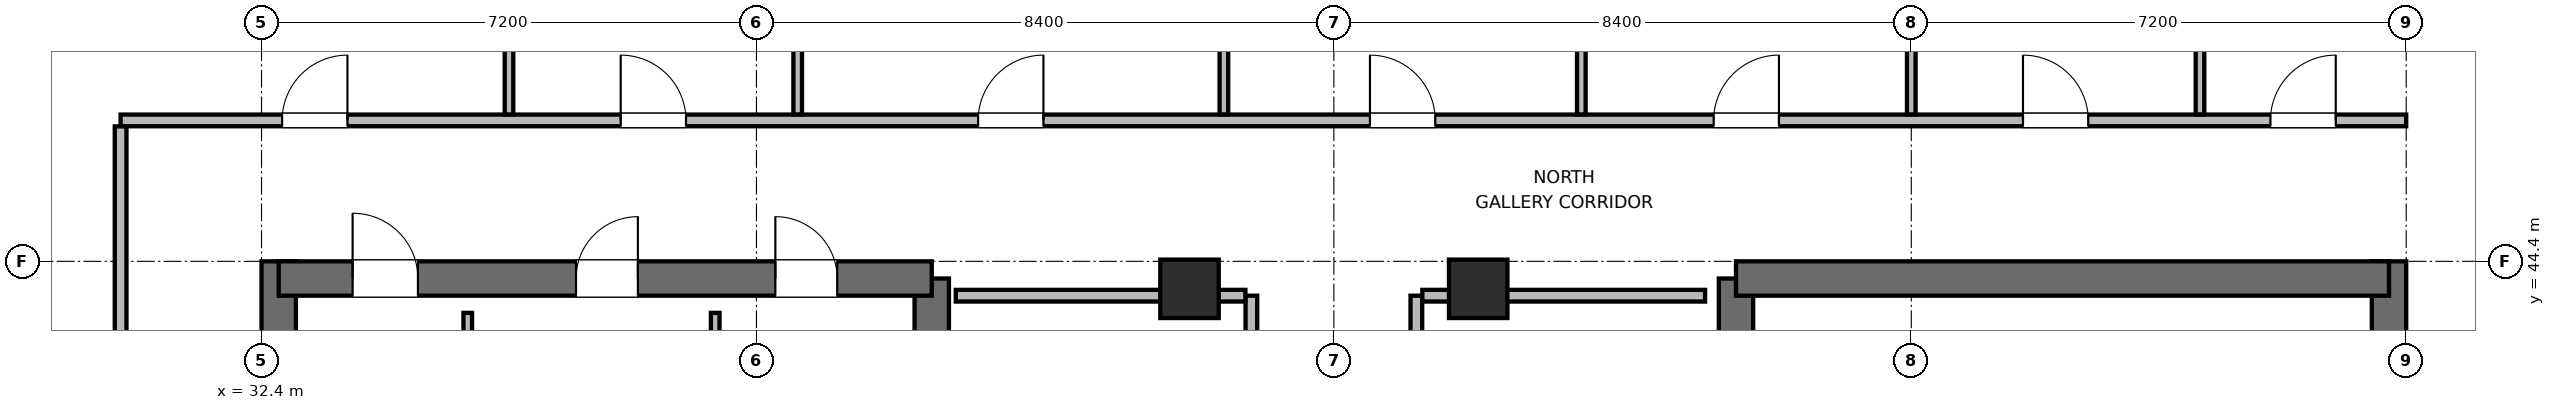
"""IFC4 building model, lengths in metres.
Left out: names, types, materials, properties, quantities, classifications, styles, units other than length and angle.
Written with IfcOpenShell. Run it as: python <this file> out.ifc"""

import sys

from ifc_helpers import new_model, si_unit, direction, frame, frame_2d, origin, origin_2d, place, context, subcontext, project, spatial, rectangle, extrude, element, fill, save


model = new_model("IFC4")
c1 = context("Model", 3, precision=1e-05, world=origin(), true_north=direction((0.0, 1.0)))
c2 = subcontext(c1, "Body", "Model", "MODEL_VIEW")
j1 = project(units=[si_unit("LENGTHUNIT", "METRE"), si_unit("PLANEANGLEUNIT", "RADIAN")], contexts=[c1])
p1 = place(None, origin())
s1 = spatial("IfcSite", under=j1, at=p1, CompositionType="ELEMENT")
p2 = place(p1, origin())
s2 = spatial("IfcBuilding", under=s1, at=p2, CompositionType="ELEMENT")
p3 = place(p2, frame((0.0, 0.0, 274.5)))
s3 = spatial("IfcBuildingStorey", under=s2, at=p3, CompositionType="ELEMENT", Elevation=274.5)
p4 = place(p3, frame((32.65, 27.6, 0.0), z_axis=(0.0, 0.0, 1.0), x_axis=(0.0, 1.0, 0.0)))
e1 = element("IfcWall", 1, at=p4, inside=s3, PredefinedType="SHEAR", context=c2, shape_type="SweptSolid", body=[
    extrude(rectangle(XDim=16.8, YDim=0.5, at=frame_2d((8.4, 0.0))), origin(), (0.0, 0.0, 1.0), 3.9),
])
p5 = place(p3, frame((42.15, 37.8, 0.0), z_axis=(0.0, 0.0, 1.0), x_axis=(0.0, 1.0, 0.0)))
e2 = element("IfcWall", 2, at=p5, inside=s3, PredefinedType="SHEAR", context=c2, shape_type="SweptSolid", body=[
    extrude(rectangle(XDim=6.35, YDim=0.5, at=frame_2d((3.175, 0.0))), origin(), (0.0, 0.0, 1.0), 3.9),
])
p6 = place(p3, frame((32.65, 44.15, 0.0), z_axis=(0.0, 0.0, 1.0), x_axis=(1.0, 0.0, 0.0)))
e3 = element("IfcWall", 3, at=p6, inside=s3, PredefinedType="SHEAR", context=c2, shape_type="SweptSolid", body=[
    extrude(rectangle(XDim=9.5, YDim=0.5, at=frame_2d((4.75, 0.0))), origin(), (0.0, 0.0, 1.0), 3.9),
])
p7 = place(p6, frame((1.075, 0.0, 0.0)))
e4 = element("IfcOpeningElement", 4, at=p7, cuts=e3, PredefinedType="OPENING", context=c2, shape_type="SweptSolid", body=[
    extrude(rectangle(XDim=0.95, YDim=2.04, at=frame_2d((0.475, 1.02))), frame((0.0, 0.26, 0.0), z_axis=(0.0, -1.0, 0.0), x_axis=(1.0, 0.0, 0.0)), (0.0, 0.0, 1.0), 0.52),
])
p8 = place(p6, frame((4.325, 0.0, 0.0)))
e5 = element("IfcOpeningElement", 5, at=p8, cuts=e3, PredefinedType="OPENING", context=c2, shape_type="SweptSolid", body=[
    extrude(rectangle(XDim=0.9, YDim=2.02, at=frame_2d((0.45, 1.01))), frame((0.0, 0.26, 0.0), z_axis=(0.0, -1.0, 0.0), x_axis=(1.0, 0.0, 0.0)), (0.0, 0.0, 1.0), 0.52),
])
p9 = place(p6, frame((7.225, 0.0, 0.0)))
e6 = element("IfcOpeningElement", 6, at=p9, cuts=e3, PredefinedType="OPENING", context=c2, shape_type="SweptSolid", body=[
    extrude(rectangle(XDim=0.9, YDim=2.02, at=frame_2d((0.45, 1.01))), frame((0.0, 0.26, 0.0), z_axis=(0.0, -1.0, 0.0), x_axis=(1.0, 0.0, 0.0)), (0.0, 0.0, 1.0), 0.52),
])
p10 = place(p3, frame((53.85, 38.0, 0.0), z_axis=(0.0, 0.0, 1.0), x_axis=(0.0, 1.0, 0.0)))
e7 = element("IfcWall", 7, at=p10, inside=s3, PredefinedType="SHEAR", context=c2, shape_type="SweptSolid", body=[
    extrude(rectangle(XDim=6.15, YDim=0.5, at=frame_2d((3.075, 0.0))), origin(), (0.0, 0.0, 1.0), 3.9),
])
p11 = place(p3, frame((63.35, 27.6, 0.0), z_axis=(0.0, 0.0, 1.0), x_axis=(0.0, 1.0, 0.0)))
e8 = element("IfcWall", 8, at=p11, inside=s3, PredefinedType="SHEAR", context=c2, shape_type="SweptSolid", body=[
    extrude(rectangle(XDim=16.8, YDim=0.5, at=frame_2d((8.4, 0.0))), origin(), (0.0, 0.0, 1.0), 3.9),
])
p12 = place(p3, frame((53.85, 44.15, 0.0), z_axis=(0.0, 0.0, 1.0), x_axis=(1.0, 0.0, 0.0)))
e9 = element("IfcWall", 9, at=p12, inside=s3, PredefinedType="SHEAR", context=c2, shape_type="SweptSolid", body=[
    extrude(rectangle(XDim=9.5, YDim=0.5, at=frame_2d((4.75, 0.0))), origin(), (0.0, 0.0, 1.0), 3.9),
])
for number, where, z_axis, x_axis in (
    (10, (45.9, 44.0, 0.0), (0.0, 0.0, 1.0), (1.0, 0.0, 0.0)),
    (11, (50.1, 44.0, 0.0), (0.0, 0.0, 1.0), (1.0, 0.0, 0.0)),
):
    element("IfcColumn", number, at=place(p3, frame(where, z_axis=z_axis, x_axis=x_axis)), inside=s3, PredefinedType="COLUMN", context=c2, shape_type="SweptSolid", body=[
        extrude(rectangle(XDim=0.85, YDim=0.85, at=origin_2d()), origin(), (0.0, 0.0, 1.0), 3.9),
    ])
for number, where, z_axis, x_axis in (
    (12, (35.4, 41.095, 0.0), (0.0, 0.0, 1.0), (0.0, 1.0, 0.0)),
    (13, (39.0, 41.095, 0.0), (0.0, 0.0, 1.0), (0.0, 1.0, 0.0)),
):
    element("IfcWall", number, at=place(p3, frame(where, z_axis=z_axis, x_axis=x_axis)), inside=s3, PredefinedType="PARTITIONING", context=c2, shape_type="SweptSolid", body=[
        extrude(rectangle(XDim=2.555, YDim=0.125, at=frame_2d((1.277, 0.0))), origin(), (0.0, 0.0, 1.0), 3.68),
    ])
p13 = place(p3, frame((46.8, 37.9, 0.0), z_axis=(0.0, 0.0, 1.0), x_axis=(0.0, 1.0, 0.0)))
e14 = element("IfcWall", 14, at=p13, inside=s3, PredefinedType="PARTITIONING", context=c2, shape_type="SweptSolid", body=[
    extrude(rectangle(XDim=6.0, YDim=0.17, at=frame_2d((3.0, 0.0))), origin(), (0.0, 0.0, 1.0), 3.68),
])
p14 = place(p13, frame((0.54, 0.0, 0.0)))
e15 = element("IfcOpeningElement", 15, at=p14, cuts=e14, PredefinedType="OPENING", context=c2, shape_type="SweptSolid", body=[
    extrude(rectangle(XDim=0.9, YDim=2.02, at=frame_2d((0.45, 1.01))), frame((0.0, 0.095, 0.0), z_axis=(0.0, -1.0, 0.0), x_axis=(1.0, 0.0, 0.0)), (0.0, 0.0, 1.0), 0.19),
])
p15 = place(p13, frame((2.55, 0.0, 0.0)))
e16 = element("IfcOpeningElement", 16, at=p15, cuts=e14, PredefinedType="OPENING", context=c2, shape_type="SweptSolid", body=[
    extrude(rectangle(XDim=0.9, YDim=2.02, at=frame_2d((0.45, 1.01))), frame((0.0, 0.095, 0.0), z_axis=(0.0, -1.0, 0.0), x_axis=(1.0, 0.0, 0.0)), (0.0, 0.0, 1.0), 0.19),
])
p16 = place(p13, frame((4.56, 0.0, 0.0)))
e17 = element("IfcOpeningElement", 17, at=p16, cuts=e14, PredefinedType="OPENING", context=c2, shape_type="SweptSolid", body=[
    extrude(rectangle(XDim=0.9, YDim=2.02, at=frame_2d((0.45, 1.01))), frame((0.0, 0.095, 0.0), z_axis=(0.0, -1.0, 0.0), x_axis=(1.0, 0.0, 0.0)), (0.0, 0.0, 1.0), 0.19),
])
p17 = place(p3, frame((42.5, 43.9, 0.0), z_axis=(0.0, 0.0, 1.0), x_axis=(1.0, 0.0, 0.0)))
e18 = element("IfcWall", 18, at=p17, inside=s3, PredefinedType="PARTITIONING", context=c2, shape_type="SweptSolid", body=[
    extrude(rectangle(XDim=4.213, YDim=0.17, at=frame_2d((2.106, 0.0))), origin(), (0.0, 0.0, 1.0), 2.765),
])
p18 = place(p3, frame((49.2, 37.9, 0.0), z_axis=(0.0, 0.0, 1.0), x_axis=(0.0, 1.0, 0.0)))
e19 = element("IfcWall", 19, at=p18, inside=s3, PredefinedType="PARTITIONING", context=c2, shape_type="SweptSolid", body=[
    extrude(rectangle(XDim=6.0, YDim=0.17, at=frame_2d((3.0, 0.0))), origin(), (0.0, 0.0, 1.0), 3.68),
])
p19 = place(p18, frame((0.69, 0.0, 0.0)))
e20 = element("IfcOpeningElement", 20, at=p19, cuts=e19, PredefinedType="OPENING", context=c2, shape_type="SweptSolid", body=[
    extrude(rectangle(XDim=0.9, YDim=2.02, at=frame_2d((0.45, 1.01))), frame((0.0, 0.095, 0.0), z_axis=(0.0, -1.0, 0.0), x_axis=(1.0, 0.0, 0.0)), (0.0, 0.0, 1.0), 0.19),
])
p20 = place(p18, frame((3.69, 0.0, 0.0)))
e21 = element("IfcOpeningElement", 21, at=p20, cuts=e19, PredefinedType="OPENING", context=c2, shape_type="SweptSolid", body=[
    extrude(rectangle(XDim=0.9, YDim=2.02, at=frame_2d((0.45, 1.01))), frame((0.0, 0.095, 0.0), z_axis=(0.0, -1.0, 0.0), x_axis=(1.0, 0.0, 0.0)), (0.0, 0.0, 1.0), 0.19),
])
p21 = place(p3, frame((49.287, 43.9, 0.0), z_axis=(0.0, 0.0, 1.0), x_axis=(1.0, 0.0, 0.0)))
e22 = element("IfcWall", 22, at=p21, inside=s3, PredefinedType="PARTITIONING", context=c2, shape_type="SweptSolid", body=[
    extrude(rectangle(XDim=4.113, YDim=0.17, at=frame_2d((2.056, 0.0))), origin(), (0.0, 0.0, 1.0), 2.765),
])
p22 = place(p3, frame((30.35, 46.45, 0.0), z_axis=(0.0, 0.0, 1.0), x_axis=(1.0, 0.0, 0.0)))
e23 = element("IfcWall", 23, at=p22, inside=s3, PredefinedType="PARTITIONING", context=c2, shape_type="SweptSolid", body=[
    extrude(rectangle(XDim=33.25, YDim=0.17, at=frame_2d((16.625, 0.0))), origin(), (0.0, 0.0, 1.0), 3.68),
])
p23 = place(p22, frame((2.35, 0.0, 0.0)))
e24 = element("IfcOpeningElement", 24, at=p23, cuts=e23, PredefinedType="OPENING", context=c2, shape_type="SweptSolid", body=[
    extrude(rectangle(XDim=0.95, YDim=2.04, at=frame_2d((0.475, 1.02))), frame((0.0, 0.095, 0.0), z_axis=(0.0, -1.0, 0.0), x_axis=(1.0, 0.0, 0.0)), (0.0, 0.0, 1.0), 0.19),
])
p24 = place(p22, frame((7.275, 0.0, 0.0)))
e25 = element("IfcOpeningElement", 25, at=p24, cuts=e23, PredefinedType="OPENING", context=c2, shape_type="SweptSolid", body=[
    extrude(rectangle(XDim=0.95, YDim=2.04, at=frame_2d((0.475, 1.02))), frame((0.0, 0.095, 0.0), z_axis=(0.0, -1.0, 0.0), x_axis=(1.0, 0.0, 0.0)), (0.0, 0.0, 1.0), 0.19),
])
p25 = place(p22, frame((12.475, 0.0, 0.0)))
e26 = element("IfcOpeningElement", 26, at=p25, cuts=e23, PredefinedType="OPENING", context=c2, shape_type="SweptSolid", body=[
    extrude(rectangle(XDim=0.95, YDim=2.04, at=frame_2d((0.475, 1.02))), frame((0.0, 0.095, 0.0), z_axis=(0.0, -1.0, 0.0), x_axis=(1.0, 0.0, 0.0)), (0.0, 0.0, 1.0), 0.19),
])
p26 = place(p22, frame((18.175, 0.0, 0.0)))
e27 = element("IfcOpeningElement", 27, at=p26, cuts=e23, PredefinedType="OPENING", context=c2, shape_type="SweptSolid", body=[
    extrude(rectangle(XDim=0.95, YDim=2.04, at=frame_2d((0.475, 1.02))), frame((0.0, 0.095, 0.0), z_axis=(0.0, -1.0, 0.0), x_axis=(1.0, 0.0, 0.0)), (0.0, 0.0, 1.0), 0.19),
])
p27 = place(p22, frame((23.175, 0.0, 0.0)))
e28 = element("IfcOpeningElement", 28, at=p27, cuts=e23, PredefinedType="OPENING", context=c2, shape_type="SweptSolid", body=[
    extrude(rectangle(XDim=0.95, YDim=2.04, at=frame_2d((0.475, 1.02))), frame((0.0, 0.095, 0.0), z_axis=(0.0, -1.0, 0.0), x_axis=(1.0, 0.0, 0.0)), (0.0, 0.0, 1.0), 0.19),
])
p28 = place(p22, frame((27.675, 0.0, 0.0)))
e29 = element("IfcOpeningElement", 29, at=p28, cuts=e23, PredefinedType="OPENING", context=c2, shape_type="SweptSolid", body=[
    extrude(rectangle(XDim=0.95, YDim=2.04, at=frame_2d((0.475, 1.02))), frame((0.0, 0.095, 0.0), z_axis=(0.0, -1.0, 0.0), x_axis=(1.0, 0.0, 0.0)), (0.0, 0.0, 1.0), 0.19),
])
p29 = place(p22, frame((31.275, 0.0, 0.0)))
e30 = element("IfcOpeningElement", 30, at=p29, cuts=e23, PredefinedType="OPENING", context=c2, shape_type="SweptSolid", body=[
    extrude(rectangle(XDim=0.95, YDim=2.04, at=frame_2d((0.475, 1.02))), frame((0.0, 0.095, 0.0), z_axis=(0.0, -1.0, 0.0), x_axis=(1.0, 0.0, 0.0)), (0.0, 0.0, 1.0), 0.19),
])
p30 = place(p3, frame((30.35, 25.637, 0.0), z_axis=(0.0, 0.0, 1.0), x_axis=(0.0, 1.0, 0.0)))
e31 = element("IfcWall", 31, at=p30, inside=s3, PredefinedType="PARTITIONING", context=c2, shape_type="SweptSolid", body=[
    extrude(rectangle(XDim=20.726, YDim=0.17, at=frame_2d((10.363, 0.0))), origin(), (0.0, 0.0, 1.0), 3.68),
])
p31 = place(p30, frame((9.888, 0.0, 0.0)))
e32 = element("IfcOpeningElement", 32, at=p31, cuts=e31, PredefinedType="OPENING", context=c2, shape_type="SweptSolid", body=[
    extrude(rectangle(XDim=0.95, YDim=2.04, at=frame_2d((0.475, 1.02))), frame((0.0, 0.095, 0.0), z_axis=(0.0, -1.0, 0.0), x_axis=(1.0, 0.0, 0.0)), (0.0, 0.0, 1.0), 0.19),
])
p32 = place(p3, frame((36.0, 46.537, 0.0), z_axis=(0.0, 0.0, 1.0), x_axis=(0.0, 1.0, 0.0)))
e33 = element("IfcWall", 33, at=p32, inside=s3, PredefinedType="PARTITIONING", context=c2, shape_type="SweptSolid", body=[
    extrude(rectangle(XDim=6.628, YDim=0.125, at=frame_2d((3.314, 0.0))), origin(), (0.0, 0.0, 1.0), 3.68),
])
p33 = place(p3, frame((40.2, 46.537, 0.0), z_axis=(0.0, 0.0, 1.0), x_axis=(0.0, 1.0, 0.0)))
e34 = element("IfcWall", 34, at=p33, inside=s3, PredefinedType="PARTITIONING", context=c2, shape_type="SweptSolid", body=[
    extrude(rectangle(XDim=6.628, YDim=0.125, at=frame_2d((3.314, 0.0))), origin(), (0.0, 0.0, 1.0), 3.043),
])
p34 = place(p3, frame((46.4, 46.537, 0.0), z_axis=(0.0, 0.0, 1.0), x_axis=(0.0, 1.0, 0.0)))
e35 = element("IfcWall", 35, at=p34, inside=s3, PredefinedType="PARTITIONING", context=c2, shape_type="SweptSolid", body=[
    extrude(rectangle(XDim=5.388, YDim=0.125, at=frame_2d((2.694, 0.0))), origin(), (0.0, 0.0, 1.0), 3.68),
])
p35 = place(p3, frame((51.6, 46.537, 0.0), z_axis=(0.0, 0.0, 1.0), x_axis=(0.0, 1.0, 0.0)))
e36 = element("IfcWall", 36, at=p35, inside=s3, PredefinedType="PARTITIONING", context=c2, shape_type="SweptSolid", body=[
    extrude(rectangle(XDim=3.308, YDim=0.125, at=frame_2d((1.654, 0.0))), origin(), (0.0, 0.0, 1.0), 3.68),
])
p36 = place(p3, frame((56.4, 46.537, 0.0), z_axis=(0.0, 0.0, 1.0), x_axis=(0.0, 1.0, 0.0)))
e37 = element("IfcWall", 37, at=p36, inside=s3, PredefinedType="PARTITIONING", context=c2, shape_type="SweptSolid", body=[
    extrude(rectangle(XDim=6.588, YDim=0.125, at=frame_2d((3.294, 0.0))), origin(), (0.0, 0.0, 1.0), 3.043),
])
p37 = place(p3, frame((60.6, 46.537, 0.0), z_axis=(0.0, 0.0, 1.0), x_axis=(0.0, 1.0, 0.0)))
e38 = element("IfcWall", 38, at=p37, inside=s3, PredefinedType="PARTITIONING", context=c2, shape_type="SweptSolid", body=[
    extrude(rectangle(XDim=6.588, YDim=0.125, at=frame_2d((3.294, 0.0))), origin(), (0.0, 0.0, 1.0), 3.68),
])
p38 = place(p7, origin())
e39 = element("IfcDoor", 39, at=p38, inside=s3, OperationType="SINGLE_SWING_LEFT", PredefinedType="DOOR", context=c2, shape_type="SweptSolid", body=[
    extrude(rectangle(XDim=0.95, YDim=2.04, at=frame_2d((0.475, 1.02))), frame((0.0, 0.025, 0.0), z_axis=(0.0, -1.0, 0.0), x_axis=(1.0, 0.0, 0.0)), (0.0, 0.0, 1.0), 0.05),
])
fill(e4, e39)
p39 = place(p8, origin())
e40 = element("IfcDoor", 40, at=p39, inside=s3, OperationType="SINGLE_SWING_RIGHT", PredefinedType="DOOR", context=c2, shape_type="SweptSolid", body=[
    extrude(rectangle(XDim=0.9, YDim=2.02, at=frame_2d((0.45, 1.01))), frame((0.0, 0.025, 0.0), z_axis=(0.0, -1.0, 0.0), x_axis=(1.0, 0.0, 0.0)), (0.0, 0.0, 1.0), 0.05),
])
fill(e5, e40)
p40 = place(p9, origin())
e41 = element("IfcDoor", 41, at=p40, inside=s3, OperationType="SINGLE_SWING_LEFT", PredefinedType="DOOR", context=c2, shape_type="SweptSolid", body=[
    extrude(rectangle(XDim=0.9, YDim=2.02, at=frame_2d((0.45, 1.01))), frame((0.0, 0.025, 0.0), z_axis=(0.0, -1.0, 0.0), x_axis=(1.0, 0.0, 0.0)), (0.0, 0.0, 1.0), 0.05),
])
fill(e6, e41)
p41 = place(p23, origin())
e42 = element("IfcDoor", 42, at=p41, inside=s3, OperationType="SINGLE_SWING_RIGHT", PredefinedType="DOOR", context=c2, shape_type="SweptSolid", body=[
    extrude(rectangle(XDim=0.95, YDim=2.04, at=frame_2d((0.475, 1.02))), frame((0.0, 0.025, 0.0), z_axis=(0.0, -1.0, 0.0), x_axis=(1.0, 0.0, 0.0)), (0.0, 0.0, 1.0), 0.05),
])
fill(e24, e42)
p42 = place(p24, origin())
e43 = element("IfcDoor", 43, at=p42, inside=s3, OperationType="SINGLE_SWING_LEFT", PredefinedType="DOOR", context=c2, shape_type="SweptSolid", body=[
    extrude(rectangle(XDim=0.95, YDim=2.04, at=frame_2d((0.475, 1.02))), frame((0.0, 0.025, 0.0), z_axis=(0.0, -1.0, 0.0), x_axis=(1.0, 0.0, 0.0)), (0.0, 0.0, 1.0), 0.05),
])
fill(e25, e43)
p43 = place(p25, origin())
e44 = element("IfcDoor", 44, at=p43, inside=s3, OperationType="SINGLE_SWING_RIGHT", PredefinedType="DOOR", context=c2, shape_type="SweptSolid", body=[
    extrude(rectangle(XDim=0.95, YDim=2.04, at=frame_2d((0.475, 1.02))), frame((0.0, 0.025, 0.0), z_axis=(0.0, -1.0, 0.0), x_axis=(1.0, 0.0, 0.0)), (0.0, 0.0, 1.0), 0.05),
])
fill(e26, e44)
p44 = place(p26, origin())
e45 = element("IfcDoor", 45, at=p44, inside=s3, OperationType="SINGLE_SWING_LEFT", PredefinedType="DOOR", context=c2, shape_type="SweptSolid", body=[
    extrude(rectangle(XDim=0.95, YDim=2.04, at=frame_2d((0.475, 1.02))), frame((0.0, 0.025, 0.0), z_axis=(0.0, -1.0, 0.0), x_axis=(1.0, 0.0, 0.0)), (0.0, 0.0, 1.0), 0.05),
])
fill(e27, e45)
p45 = place(p27, origin())
e46 = element("IfcDoor", 46, at=p45, inside=s3, OperationType="SINGLE_SWING_RIGHT", PredefinedType="DOOR", context=c2, shape_type="SweptSolid", body=[
    extrude(rectangle(XDim=0.95, YDim=2.04, at=frame_2d((0.475, 1.02))), frame((0.0, 0.025, 0.0), z_axis=(0.0, -1.0, 0.0), x_axis=(1.0, 0.0, 0.0)), (0.0, 0.0, 1.0), 0.05),
])
fill(e28, e46)
p46 = place(p28, origin())
e47 = element("IfcDoor", 47, at=p46, inside=s3, OperationType="SINGLE_SWING_LEFT", PredefinedType="DOOR", context=c2, shape_type="SweptSolid", body=[
    extrude(rectangle(XDim=0.95, YDim=2.04, at=frame_2d((0.475, 1.02))), frame((0.0, 0.025, 0.0), z_axis=(0.0, -1.0, 0.0), x_axis=(1.0, 0.0, 0.0)), (0.0, 0.0, 1.0), 0.05),
])
fill(e29, e47)
p47 = place(p29, origin())
e48 = element("IfcDoor", 48, at=p47, inside=s3, OperationType="SINGLE_SWING_RIGHT", PredefinedType="DOOR", context=c2, shape_type="SweptSolid", body=[
    extrude(rectangle(XDim=0.95, YDim=2.04, at=frame_2d((0.475, 1.02))), frame((0.0, 0.025, 0.0), z_axis=(0.0, -1.0, 0.0), x_axis=(1.0, 0.0, 0.0)), (0.0, 0.0, 1.0), 0.05),
])
fill(e30, e48)
save(model, sys.argv[1])
